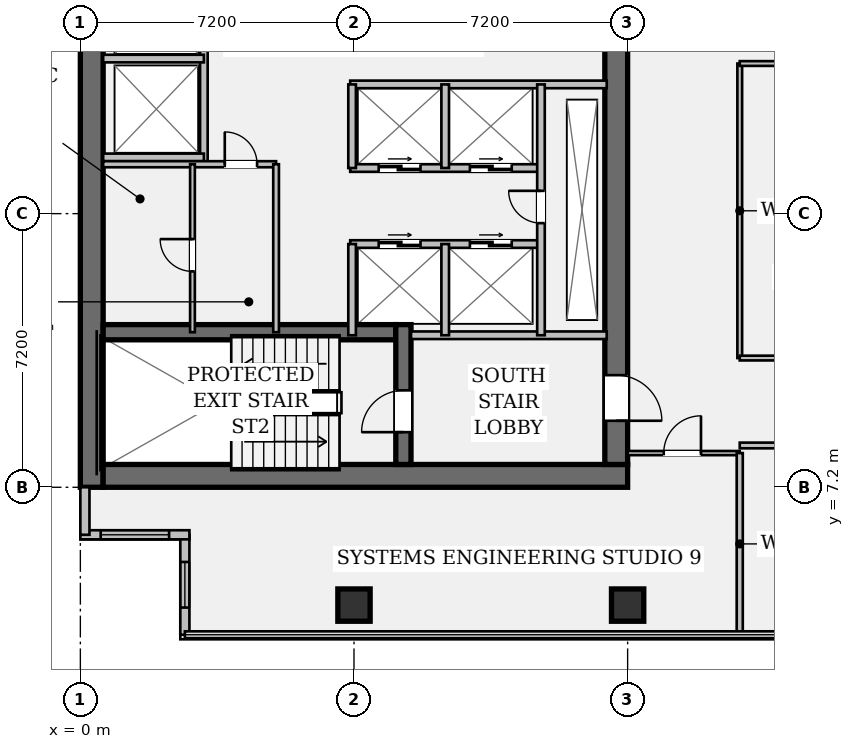
"""IFC4 building model, lengths in metres.
Left out: names, types, materials, properties, quantities, classifications, styles, units other than length and angle.
Written with IfcOpenShell. Run it as: python <this file> out.ifc"""

import sys

from ifc_helpers import new_model, si_unit, direction, frame, frame_2d, origin, origin_2d, place, context, subcontext, project, spatial, rectangle, hollow_rectangle, extrude, element, fill, save


model = new_model("IFC4")
c1 = context("Model", 3, precision=1e-05, world=origin(), true_north=direction((0.0, 1.0)))
c2 = subcontext(c1, "Body", "Model", "MODEL_VIEW")
j1 = project(units=[si_unit("LENGTHUNIT", "METRE"), si_unit("PLANEANGLEUNIT", "RADIAN")], contexts=[c1])
p1 = place(None, origin())
s1 = spatial("IfcSite", under=j1, at=p1, CompositionType="ELEMENT")
p2 = place(p1, origin())
s2 = spatial("IfcBuilding", under=s1, at=p2, CompositionType="ELEMENT")
p3 = place(p2, frame((0.0, 0.0, 159.95)))
s3 = spatial("IfcBuildingStorey", under=s2, at=p3, CompositionType="ELEMENT", Elevation=159.95)
p4 = place(p3, frame((0.3, 7.2, 0.0), z_axis=(0.0, 0.0, 1.0), x_axis=(0.0, 1.0, 0.0)))
e1 = element("IfcWall", 1, at=p4, inside=s3, PredefinedType="SHEAR", context=c2, shape_type="SweptSolid", body=[
    extrude(rectangle(XDim=28.8, YDim=0.6, at=frame_2d((14.4, 0.0))), origin(), (0.0, 0.0, 1.0), 3.58),
])
p5 = place(p3, frame((0.6, 7.5, 0.0), z_axis=(0.0, 0.0, 1.0), x_axis=(1.0, 0.0, 0.0)))
e2 = element("IfcWall", 2, at=p5, inside=s3, PredefinedType="SHEAR", context=c2, shape_type="SweptSolid", body=[
    extrude(rectangle(XDim=13.8, YDim=0.6, at=frame_2d((6.9, 0.0))), origin(), (0.0, 0.0, 1.0), 3.58),
])
p6 = place(p3, frame((14.1, 35.4, 0.0), z_axis=(0.0, 0.0, 1.0), x_axis=(0.0, -1.0, 0.0)))
e3 = element("IfcWall", 3, at=p6, inside=s3, PredefinedType="SHEAR", context=c2, shape_type="SweptSolid", body=[
    extrude(rectangle(XDim=27.6, YDim=0.6, at=frame_2d((13.8, 0.0))), origin(), (0.0, 0.0, 1.0), 3.58),
])
p7 = place(p6, frame((1.3, 0.0, 0.0)))
e4 = element("IfcOpeningElement", 4, at=p7, cuts=e3, PredefinedType="OPENING", context=c2, shape_type="SweptSolid", body=[
    extrude(rectangle(XDim=1.2, YDim=2.15, at=frame_2d((0.6, 1.075))), frame((0.0, 0.312, 0.0), z_axis=(0.0, -1.0, 0.0), x_axis=(1.0, 0.0, 0.0)), (0.0, 0.0, 1.0), 0.624),
])
p8 = place(p6, frame((25.25, 0.0, 0.0)))
e5 = element("IfcOpeningElement", 5, at=p8, cuts=e3, PredefinedType="OPENING", context=c2, shape_type="SweptSolid", body=[
    extrude(rectangle(XDim=1.2, YDim=2.15, at=frame_2d((0.6, 1.075))), frame((0.0, 0.312, 0.0), z_axis=(0.0, -1.0, 0.0), x_axis=(1.0, 0.0, 0.0)), (0.0, 0.0, 1.0), 0.624),
])
p9 = place(p6, frame((14.6, 0.0, 0.0)))
e6 = element("IfcOpeningElement", 6, at=p9, cuts=e3, PredefinedType="OPENING", context=c2, shape_type="SweptSolid", body=[
    extrude(rectangle(XDim=1.6, YDim=2.2, at=frame_2d((0.8, 1.1))), frame((0.0, 0.312, 0.0), z_axis=(0.0, -1.0, 0.0), x_axis=(1.0, 0.0, 0.0)), (0.0, 0.0, 1.0), 0.624),
])
p10 = place(p3, frame((0.6, 11.28, 0.0), z_axis=(0.0, 0.0, 1.0), x_axis=(1.0, 0.0, 0.0)))
e7 = element("IfcWall", 7, at=p10, inside=s3, PredefinedType="SHEAR", context=c2, shape_type="SweptSolid", body=[
    extrude(rectangle(XDim=7.7, YDim=0.4, at=frame_2d((3.85, 0.0))), origin(), (0.0, 0.0, 1.0), 3.58),
])
p11 = place(p3, frame((8.5, 7.8, 0.0), z_axis=(0.0, 0.0, 1.0), x_axis=(0.0, 1.0, 0.0)))
e8 = element("IfcWall", 8, at=p11, inside=s3, PredefinedType="SHEAR", context=c2, shape_type="SweptSolid", body=[
    extrude(rectangle(XDim=3.68, YDim=0.4, at=frame_2d((1.84, 0.0))), origin(), (0.0, 0.0, 1.0), 3.58),
])
p12 = place(p11, frame((0.85, 0.0, 0.0)))
e9 = element("IfcOpeningElement", 9, at=p12, cuts=e8, PredefinedType="OPENING", context=c2, shape_type="SweptSolid", body=[
    extrude(rectangle(XDim=1.1, YDim=2.15, at=frame_2d((0.55, 1.075))), frame((0.0, 0.212, 0.0), z_axis=(0.0, -1.0, 0.0), x_axis=(1.0, 0.0, 0.0)), (0.0, 0.0, 1.0), 0.424),
])
for number, where, z_axis, x_axis in (
    (10, (7.2, 4.1, 0.0), (0.0, 0.0, 1.0), (1.0, 0.0, 0.0)),
    (11, (14.4, 4.1, 0.0), (0.0, 0.0, 1.0), (1.0, 0.0, 0.0)),
):
    element("IfcColumn", number, at=place(p3, frame(where, z_axis=z_axis, x_axis=x_axis)), inside=s3, PredefinedType="COLUMN", context=c2, shape_type="SweptSolid", body=[
        extrude(hollow_rectangle(XDim=0.85, YDim=0.85, WallThickness=0.05, at=origin_2d()), origin(), (0.0, 0.0, 1.0), 3.58),
    ])
p13 = place(p3, frame((2.75, 3.32, 0.0), z_axis=(0.0, 0.0, 1.0), x_axis=(0.0, 1.0, 0.0)))
e12 = element("IfcWall", 12, at=p13, inside=s3, PredefinedType="STANDARD", context=c2, shape_type="SweptSolid", body=[
    extrude(rectangle(XDim=2.63, YDim=0.24, at=frame_2d((1.315, 0.0))), origin(), (0.0, 0.0, 1.0), 3.58),
])
p14 = place(p13, frame((0.715, 0.0, 0.95)))
e13 = element("IfcOpeningElement", 13, at=p14, cuts=e12, PredefinedType="OPENING", context=c2, shape_type="SweptSolid", body=[
    extrude(rectangle(XDim=1.2, YDim=1.8, at=frame_2d((0.6, 0.9))), frame((0.0, 0.132, 0.0), z_axis=(0.0, -1.0, 0.0), x_axis=(1.0, 0.0, 0.0)), (0.0, 0.0, 1.0), 0.264),
])
p15 = place(p3, frame((2.87, 5.95, 0.0), z_axis=(0.0, 0.0, 1.0), x_axis=(-1.0, 0.0, 0.0)))
e14 = element("IfcWall", 14, at=p15, inside=s3, PredefinedType="STANDARD", context=c2, shape_type="SweptSolid", body=[
    extrude(rectangle(XDim=2.87, YDim=0.24, at=frame_2d((1.435, 0.0))), origin(), (0.0, 0.0, 1.0), 3.58),
])
p16 = place(p15, frame((0.535, 0.0, 0.95)))
e15 = element("IfcOpeningElement", 15, at=p16, cuts=e14, PredefinedType="OPENING", context=c2, shape_type="SweptSolid", body=[
    extrude(rectangle(XDim=1.8, YDim=1.35, at=frame_2d((0.9, 0.675))), frame((0.0, 0.132, 0.0), z_axis=(0.0, -1.0, 0.0), x_axis=(1.0, 0.0, 0.0)), (0.0, 0.0, 1.0), 0.264),
])
p17 = place(p3, frame((0.12, 5.95, 0.0), z_axis=(0.0, 0.0, 1.0), x_axis=(0.0, 1.0, 0.0)))
e16 = element("IfcWall", 16, at=p17, inside=s3, PredefinedType="STANDARD", context=c2, shape_type="SweptSolid", body=[
    extrude(rectangle(XDim=1.25, YDim=0.24, at=frame_2d((0.625, 0.0))), origin(), (0.0, 0.0, 1.0), 3.58),
])
p18 = place(p3, frame((8.7, 11.2, 0.0), z_axis=(0.0, 0.0, 1.0), x_axis=(1.0, 0.0, 0.0)))
e17 = element("IfcWall", 17, at=p18, inside=s3, PredefinedType="PARTITIONING", context=c2, shape_type="SweptSolid", body=[
    extrude(rectangle(XDim=5.15, YDim=0.2, at=frame_2d((2.575, 0.0))), origin(), (0.0, 0.0, 1.0), 3.58),
])
p19 = place(p3, frame((3.25, 15.7, 0.0), z_axis=(0.0, 0.0, 1.0), x_axis=(0.0, 1.0, 0.0)))
e18 = element("IfcWall", 18, at=p19, inside=s3, PredefinedType="PARTITIONING", context=c2, shape_type="SweptSolid", body=[
    extrude(rectangle(XDim=13.08, YDim=0.2, at=frame_2d((6.54, 0.0))), origin(), (0.0, 0.0, 1.0), 3.58),
])
for number, where, z_axis, x_axis in (
    (19, (0.6, 15.88, 0.0), (0.0, 0.0, 1.0), (1.0, 0.0, 0.0)),
    (20, (0.6, 18.48, 0.0), (0.0, 0.0, 1.0), (1.0, 0.0, 0.0)),
):
    element("IfcWall", number, at=place(p3, frame(where, z_axis=z_axis, x_axis=x_axis)), inside=s3, PredefinedType="PARTITIONING", context=c2, shape_type="SweptSolid", body=[
        extrude(rectangle(XDim=2.65, YDim=0.2, at=frame_2d((1.325, 0.0))), origin(), (0.0, 0.0, 1.0), 3.58),
    ])
p20 = place(p3, frame((7.1, 17.8, 0.0), z_axis=(0.0, 0.0, 1.0), x_axis=(1.0, 0.0, 0.0)))
e21 = element("IfcWall", 21, at=p20, inside=s3, PredefinedType="PARTITIONING", context=c2, shape_type="SweptSolid", body=[
    extrude(rectangle(XDim=6.75, YDim=0.2, at=frame_2d((3.375, 0.0))), origin(), (0.0, 0.0, 1.0), 3.58),
])
p21 = place(p3, frame((7.1, 15.6, 0.0), z_axis=(0.0, 0.0, 1.0), x_axis=(1.0, 0.0, 0.0)))
e22 = element("IfcWall", 22, at=p21, inside=s3, PredefinedType="PARTITIONING", context=c2, shape_type="SweptSolid", body=[
    extrude(rectangle(XDim=5.02, YDim=0.2, at=frame_2d((2.51, 0.0))), origin(), (0.0, 0.0, 1.0), 3.58),
])
p22 = place(p21, frame((0.75, 0.0, 0.0)))
e23 = element("IfcOpeningElement", 23, at=p22, cuts=e22, PredefinedType="OPENING", context=c2, shape_type="SweptSolid", body=[
    extrude(rectangle(XDim=1.1, YDim=2.2, at=frame_2d((0.55, 1.1))), frame((0.0, 0.112, 0.0), z_axis=(0.0, -1.0, 0.0), x_axis=(1.0, 0.0, 0.0)), (0.0, 0.0, 1.0), 0.224),
])
p23 = place(p21, frame((3.15, 0.0, 0.0)))
e24 = element("IfcOpeningElement", 24, at=p23, cuts=e22, PredefinedType="OPENING", context=c2, shape_type="SweptSolid", body=[
    extrude(rectangle(XDim=1.1, YDim=2.2, at=frame_2d((0.55, 1.1))), frame((0.0, 0.112, 0.0), z_axis=(0.0, -1.0, 0.0), x_axis=(1.0, 0.0, 0.0)), (0.0, 0.0, 1.0), 0.224),
])
p24 = place(p3, frame((7.1, 13.6, 0.0), z_axis=(0.0, 0.0, 1.0), x_axis=(1.0, 0.0, 0.0)))
e25 = element("IfcWall", 25, at=p24, inside=s3, PredefinedType="PARTITIONING", context=c2, shape_type="SweptSolid", body=[
    extrude(rectangle(XDim=5.02, YDim=0.2, at=frame_2d((2.51, 0.0))), origin(), (0.0, 0.0, 1.0), 3.58),
])
p25 = place(p24, frame((0.75, 0.0, 0.0)))
e26 = element("IfcOpeningElement", 26, at=p25, cuts=e25, PredefinedType="OPENING", context=c2, shape_type="SweptSolid", body=[
    extrude(rectangle(XDim=1.1, YDim=2.2, at=frame_2d((0.55, 1.1))), frame((0.0, 0.112, 0.0), z_axis=(0.0, -1.0, 0.0), x_axis=(1.0, 0.0, 0.0)), (0.0, 0.0, 1.0), 0.224),
])
p26 = place(p24, frame((3.15, 0.0, 0.0)))
e27 = element("IfcOpeningElement", 27, at=p26, cuts=e25, PredefinedType="OPENING", context=c2, shape_type="SweptSolid", body=[
    extrude(rectangle(XDim=1.1, YDim=2.2, at=frame_2d((0.55, 1.1))), frame((0.0, 0.112, 0.0), z_axis=(0.0, -1.0, 0.0), x_axis=(1.0, 0.0, 0.0)), (0.0, 0.0, 1.0), 0.224),
])
p27 = place(p3, frame((7.15, 15.6, 0.0), z_axis=(0.0, 0.0, 1.0), x_axis=(0.0, 1.0, 0.0)))
e28 = element("IfcWall", 28, at=p27, inside=s3, PredefinedType="PARTITIONING", context=c2, shape_type="SweptSolid", body=[
    extrude(rectangle(XDim=2.2, YDim=0.2, at=frame_2d((1.1, 0.0))), origin(), (0.0, 0.0, 1.0), 3.58),
])
p28 = place(p3, frame((7.15, 11.2, 0.0), z_axis=(0.0, 0.0, 1.0), x_axis=(0.0, 1.0, 0.0)))
e29 = element("IfcWall", 29, at=p28, inside=s3, PredefinedType="PARTITIONING", context=c2, shape_type="SweptSolid", body=[
    extrude(rectangle(XDim=2.4, YDim=0.2, at=frame_2d((1.2, 0.0))), origin(), (0.0, 0.0, 1.0), 3.58),
])
p29 = place(p3, frame((9.6, 15.6, 0.0), z_axis=(0.0, 0.0, 1.0), x_axis=(0.0, 1.0, 0.0)))
e30 = element("IfcWall", 30, at=p29, inside=s3, PredefinedType="PARTITIONING", context=c2, shape_type="SweptSolid", body=[
    extrude(rectangle(XDim=2.2, YDim=0.2, at=frame_2d((1.1, 0.0))), origin(), (0.0, 0.0, 1.0), 3.58),
])
p30 = place(p3, frame((9.6, 11.2, 0.0), z_axis=(0.0, 0.0, 1.0), x_axis=(0.0, 1.0, 0.0)))
e31 = element("IfcWall", 31, at=p30, inside=s3, PredefinedType="PARTITIONING", context=c2, shape_type="SweptSolid", body=[
    extrude(rectangle(XDim=2.4, YDim=0.2, at=frame_2d((1.2, 0.0))), origin(), (0.0, 0.0, 1.0), 3.58),
])
p31 = place(p3, frame((12.12, 11.2, 0.0), z_axis=(0.0, 0.0, 1.0), x_axis=(0.0, 1.0, 0.0)))
e32 = element("IfcWall", 32, at=p31, inside=s3, PredefinedType="PARTITIONING", context=c2, shape_type="SweptSolid", body=[
    extrude(rectangle(XDim=6.6, YDim=0.2, at=frame_2d((3.3, 0.0))), origin(), (0.0, 0.0, 1.0), 3.58),
])
p32 = place(p31, frame((2.95, 0.0, 0.0)))
e33 = element("IfcOpeningElement", 33, at=p32, cuts=e32, PredefinedType="OPENING", context=c2, shape_type="SweptSolid", body=[
    extrude(rectangle(XDim=0.85, YDim=2.15, at=frame_2d((0.425, 1.075))), frame((0.0, 0.112, 0.0), z_axis=(0.0, -1.0, 0.0), x_axis=(1.0, 0.0, 0.0)), (0.0, 0.0, 1.0), 0.224),
])
p33 = place(p3, frame((0.6, 15.7, 0.0), z_axis=(0.0, 0.0, 1.0), x_axis=(1.0, 0.0, 0.0)))
e34 = element("IfcWall", 34, at=p33, inside=s3, PredefinedType="PARTITIONING", context=c2, shape_type="SweptSolid", body=[
    extrude(rectangle(XDim=4.55, YDim=0.16, at=frame_2d((2.275, 0.0))), origin(), (0.0, 0.0, 1.0), 3.58),
])
p34 = place(p33, frame((3.2, 0.0, 0.0)))
e35 = element("IfcOpeningElement", 35, at=p34, cuts=e34, PredefinedType="OPENING", context=c2, shape_type="SweptSolid", body=[
    extrude(rectangle(XDim=0.85, YDim=2.15, at=frame_2d((0.425, 1.075))), frame((0.0, 0.092, 0.0), z_axis=(0.0, -1.0, 0.0), x_axis=(1.0, 0.0, 0.0)), (0.0, 0.0, 1.0), 0.184),
])
p35 = place(p3, frame((5.15, 11.28, 0.0), z_axis=(0.0, 0.0, 1.0), x_axis=(0.0, 1.0, 0.0)))
e36 = element("IfcWall", 36, at=p35, inside=s3, PredefinedType="PARTITIONING", context=c2, shape_type="SweptSolid", body=[
    extrude(rectangle(XDim=4.42, YDim=0.15, at=frame_2d((2.21, 0.0))), origin(), (0.0, 0.0, 1.0), 3.58),
])
p36 = place(p3, frame((2.95, 11.28, 0.0), z_axis=(0.0, 0.0, 1.0), x_axis=(0.0, 1.0, 0.0)))
e37 = element("IfcWall", 37, at=p36, inside=s3, PredefinedType="PARTITIONING", context=c2, shape_type="SweptSolid", body=[
    extrude(rectangle(XDim=4.42, YDim=0.125, at=frame_2d((2.21, 0.0))), origin(), (0.0, 0.0, 1.0), 3.58),
])
p37 = place(p36, frame((1.6, 0.0, 0.0)))
e38 = element("IfcOpeningElement", 38, at=p37, cuts=e37, PredefinedType="OPENING", context=c2, shape_type="SweptSolid", body=[
    extrude(rectangle(XDim=0.85, YDim=2.15, at=frame_2d((0.425, 1.075))), frame((0.0, 0.074, 0.0), z_axis=(0.0, -1.0, 0.0), x_axis=(1.0, 0.0, 0.0)), (0.0, 0.0, 1.0), 0.149),
])
p38 = place(p3, frame((14.4, 8.1, 0.0), z_axis=(0.0, 0.0, 1.0), x_axis=(1.0, 0.0, 0.0)))
e39 = element("IfcWall", 39, at=p38, inside=s3, PredefinedType="PARTITIONING", context=c2, shape_type="SweptSolid", body=[
    extrude(rectangle(XDim=2.95, YDim=0.11, at=frame_2d((1.475, 0.0))), origin(), (0.0, 0.0, 1.0), 3.148),
])
p39 = place(p38, frame((0.95, 0.0, 0.0)))
e40 = element("IfcOpeningElement", 40, at=p39, cuts=e39, PredefinedType="OPENING", context=c2, shape_type="SweptSolid", body=[
    extrude(rectangle(XDim=0.98, YDim=2.15, at=frame_2d((0.49, 1.075))), frame((0.0, 0.067, 0.0), z_axis=(0.0, -1.0, 0.0), x_axis=(1.0, 0.0, 0.0)), (0.0, 0.0, 1.0), 0.134),
])
p40 = place(p3, frame((17.35, 8.3, 0.0), z_axis=(0.0, 0.0, 1.0), x_axis=(1.0, 0.0, 0.0)))
e41 = element("IfcWall", 41, at=p40, inside=s3, PredefinedType="PARTITIONING", context=c2, shape_type="SweptSolid", body=[
    extrude(rectangle(XDim=21.15, YDim=0.15, at=frame_2d((10.575, 0.0))), origin(), (0.0, 0.0, 1.0), 2.869),
])
p41 = place(p40, frame((2.32, 0.0, 0.0)))
e42 = element("IfcOpeningElement", 42, at=p41, cuts=e41, PredefinedType="OPENING", context=c2, shape_type="SweptSolid", body=[
    extrude(rectangle(XDim=0.98, YDim=2.15, at=frame_2d((0.49, 1.075))), frame((0.0, 0.087, 0.0), z_axis=(0.0, -1.0, 0.0), x_axis=(1.0, 0.0, 0.0)), (0.0, 0.0, 1.0), 0.174),
])
p42 = place(p40, frame((9.85, 0.0, 0.0)))
e43 = element("IfcOpeningElement", 43, at=p42, cuts=e41, PredefinedType="OPENING", context=c2, shape_type="SweptSolid", body=[
    extrude(rectangle(XDim=0.98, YDim=2.15, at=frame_2d((0.49, 1.075))), frame((0.0, 0.087, 0.0), z_axis=(0.0, -1.0, 0.0), x_axis=(1.0, 0.0, 0.0)), (0.0, 0.0, 1.0), 0.174),
])
p43 = place(p40, frame((16.8, 0.0, 0.0)))
e44 = element("IfcOpeningElement", 44, at=p43, cuts=e41, PredefinedType="OPENING", context=c2, shape_type="SweptSolid", body=[
    extrude(rectangle(XDim=0.98, YDim=2.15, at=frame_2d((0.49, 1.075))), frame((0.0, 0.087, 0.0), z_axis=(0.0, -1.0, 0.0), x_axis=(1.0, 0.0, 0.0)), (0.0, 0.0, 1.0), 0.174),
])
p44 = place(p3, frame((17.35, 10.6, 0.0), z_axis=(0.0, 0.0, 1.0), x_axis=(0.0, 1.0, 0.0)))
e45 = element("IfcWall", 45, at=p44, inside=s3, PredefinedType="PARTITIONING", context=c2, shape_type="SweptSolid", body=[
    extrude(rectangle(XDim=7.75, YDim=0.125, at=frame_2d((3.875, 0.0))), origin(), (0.0, 0.0, 1.0), 2.869),
])
p45 = place(p3, frame((17.35, 10.6, 0.0), z_axis=(0.0, 0.0, 1.0), x_axis=(1.0, 0.0, 0.0)))
e46 = element("IfcWall", 46, at=p45, inside=s3, PredefinedType="PARTITIONING", context=c2, shape_type="SweptSolid", body=[
    extrude(rectangle(XDim=18.8, YDim=0.125, at=frame_2d((9.4, 0.0))), origin(), (0.0, 0.0, 1.0), 2.869),
])
p46 = place(p3, frame((17.35, 18.35, 0.0), z_axis=(0.0, 0.0, 1.0), x_axis=(1.0, 0.0, 0.0)))
e47 = element("IfcWall", 47, at=p46, inside=s3, PredefinedType="PARTITIONING", context=c2, shape_type="SweptSolid", body=[
    extrude(rectangle(XDim=18.8, YDim=0.125, at=frame_2d((9.4, 0.0))), origin(), (0.0, 0.0, 1.0), 2.869),
])
p47 = place(p46, frame((2.82, 0.0, 0.0)))
e48 = element("IfcOpeningElement", 48, at=p47, cuts=e47, PredefinedType="OPENING", context=c2, shape_type="SweptSolid", body=[
    extrude(rectangle(XDim=0.98, YDim=2.15, at=frame_2d((0.49, 1.075))), frame((0.0, 0.074, 0.0), z_axis=(0.0, -1.0, 0.0), x_axis=(1.0, 0.0, 0.0)), (0.0, 0.0, 1.0), 0.149),
])
p48 = place(p46, frame((9.75, 0.0, 0.0)))
e49 = element("IfcOpeningElement", 49, at=p48, cuts=e47, PredefinedType="OPENING", context=c2, shape_type="SweptSolid", body=[
    extrude(rectangle(XDim=0.98, YDim=2.15, at=frame_2d((0.49, 1.075))), frame((0.0, 0.074, 0.0), z_axis=(0.0, -1.0, 0.0), x_axis=(1.0, 0.0, 0.0)), (0.0, 0.0, 1.0), 0.149),
])
p49 = place(p46, frame((15.82, 0.0, 0.0)))
e50 = element("IfcOpeningElement", 50, at=p49, cuts=e47, PredefinedType="OPENING", context=c2, shape_type="SweptSolid", body=[
    extrude(rectangle(XDim=0.98, YDim=2.15, at=frame_2d((0.49, 1.075))), frame((0.0, 0.074, 0.0), z_axis=(0.0, -1.0, 0.0), x_axis=(1.0, 0.0, 0.0)), (0.0, 0.0, 1.0), 0.149),
])
p50 = place(p3, frame((17.35, 3.32, 0.0), z_axis=(0.0, 0.0, 1.0), x_axis=(0.0, 1.0, 0.0)))
e51 = element("IfcWall", 51, at=p50, inside=s3, PredefinedType="PARTITIONING", context=c2, shape_type="SweptSolid", body=[
    extrude(rectangle(XDim=4.78, YDim=0.16, at=frame_2d((2.39, 0.0))), origin(), (0.0, 0.0, 1.0), 2.869),
])
p51 = place(p14, origin())
e52 = element("IfcWindow", 52, at=p51, inside=s3, PartitioningType="SINGLE_PANEL", PredefinedType="WINDOW", context=c2, shape_type="SweptSolid", body=[
    extrude(rectangle(XDim=1.2, YDim=1.8, at=frame_2d((0.6, 0.9))), frame((0.0, 0.03, 0.0), z_axis=(0.0, -1.0, 0.0), x_axis=(1.0, 0.0, 0.0)), (0.0, 0.0, 1.0), 0.06),
])
fill(e13, e52)
p52 = place(p16, origin())
e53 = element("IfcWindow", 53, at=p52, inside=s3, PartitioningType="SINGLE_PANEL", PredefinedType="WINDOW", context=c2, shape_type="SweptSolid", body=[
    extrude(rectangle(XDim=1.8, YDim=1.35, at=frame_2d((0.9, 0.675))), frame((0.0, 0.03, 0.0), z_axis=(0.0, -1.0, 0.0), x_axis=(1.0, 0.0, 0.0)), (0.0, 0.0, 1.0), 0.06),
])
fill(e15, e53)
p53 = place(p12, origin())
e54 = element("IfcDoor", 54, at=p53, inside=s3, OperationType="SINGLE_SWING_LEFT", PredefinedType="DOOR", context=c2, shape_type="SweptSolid", body=[
    extrude(rectangle(XDim=1.1, YDim=2.15, at=frame_2d((0.55, 1.075))), frame((0.0, 0.025, 0.0), z_axis=(0.0, -1.0, 0.0), x_axis=(1.0, 0.0, 0.0)), (0.0, 0.0, 1.0), 0.05),
])
fill(e9, e54)
p54 = place(p8, origin())
e55 = element("IfcDoor", 55, at=p54, inside=s3, OperationType="SINGLE_SWING_RIGHT", PredefinedType="DOOR", context=c2, shape_type="SweptSolid", body=[
    extrude(rectangle(XDim=1.2, YDim=2.15, at=frame_2d((0.6, 1.075))), frame((0.0, 0.025, 0.0), z_axis=(0.0, -1.0, 0.0), x_axis=(1.0, 0.0, 0.0)), (0.0, 0.0, 1.0), 0.05),
])
fill(e5, e55)
p55 = place(p32, origin())
e56 = element("IfcDoor", 56, at=p55, inside=s3, OperationType="SINGLE_SWING_RIGHT", PredefinedType="DOOR", context=c2, shape_type="SweptSolid", body=[
    extrude(rectangle(XDim=0.85, YDim=2.15, at=frame_2d((0.425, 1.075))), frame((0.0, 0.025, 0.0), z_axis=(0.0, -1.0, 0.0), x_axis=(1.0, 0.0, 0.0)), (0.0, 0.0, 1.0), 0.05),
])
fill(e33, e56)
p56 = place(p22, origin())
e57 = element("IfcDoor", 57, at=p56, inside=s3, OperationType="DOUBLE_DOOR_SLIDING", PredefinedType="DOOR", context=c2, shape_type="SweptSolid", body=[
    extrude(rectangle(XDim=1.1, YDim=2.2, at=frame_2d((0.55, 1.1))), frame((0.0, 0.025, 0.0), z_axis=(0.0, -1.0, 0.0), x_axis=(1.0, 0.0, 0.0)), (0.0, 0.0, 1.0), 0.05),
])
fill(e23, e57)
p57 = place(p23, origin())
e58 = element("IfcDoor", 58, at=p57, inside=s3, OperationType="DOUBLE_DOOR_SLIDING", PredefinedType="DOOR", context=c2, shape_type="SweptSolid", body=[
    extrude(rectangle(XDim=1.1, YDim=2.2, at=frame_2d((0.55, 1.1))), frame((0.0, 0.025, 0.0), z_axis=(0.0, -1.0, 0.0), x_axis=(1.0, 0.0, 0.0)), (0.0, 0.0, 1.0), 0.05),
])
fill(e24, e58)
p58 = place(p25, origin())
e59 = element("IfcDoor", 59, at=p58, inside=s3, OperationType="DOUBLE_DOOR_SLIDING", PredefinedType="DOOR", context=c2, shape_type="SweptSolid", body=[
    extrude(rectangle(XDim=1.1, YDim=2.2, at=frame_2d((0.55, 1.1))), frame((0.0, 0.025, 0.0), z_axis=(0.0, -1.0, 0.0), x_axis=(1.0, 0.0, 0.0)), (0.0, 0.0, 1.0), 0.05),
])
fill(e26, e59)
p59 = place(p26, origin())
e60 = element("IfcDoor", 60, at=p59, inside=s3, OperationType="DOUBLE_DOOR_SLIDING", PredefinedType="DOOR", context=c2, shape_type="SweptSolid", body=[
    extrude(rectangle(XDim=1.1, YDim=2.2, at=frame_2d((0.55, 1.1))), frame((0.0, 0.025, 0.0), z_axis=(0.0, -1.0, 0.0), x_axis=(1.0, 0.0, 0.0)), (0.0, 0.0, 1.0), 0.05),
])
fill(e27, e60)
p60 = place(p34, origin())
e61 = element("IfcDoor", 61, at=p60, inside=s3, OperationType="SINGLE_SWING_LEFT", PredefinedType="DOOR", context=c2, shape_type="SweptSolid", body=[
    extrude(rectangle(XDim=0.85, YDim=2.15, at=frame_2d((0.425, 1.075))), frame((0.0, 0.025, 0.0), z_axis=(0.0, -1.0, 0.0), x_axis=(1.0, 0.0, 0.0)), (0.0, 0.0, 1.0), 0.05),
])
fill(e35, e61)
p61 = place(p37, origin())
e62 = element("IfcDoor", 62, at=p61, inside=s3, OperationType="SINGLE_SWING_RIGHT", PredefinedType="DOOR", context=c2, shape_type="SweptSolid", body=[
    extrude(rectangle(XDim=0.85, YDim=2.15, at=frame_2d((0.425, 1.075))), frame((0.0, 0.025, 0.0), z_axis=(0.0, -1.0, 0.0), x_axis=(1.0, 0.0, 0.0)), (0.0, 0.0, 1.0), 0.05),
])
fill(e38, e62)
p62 = place(p39, origin())
e63 = element("IfcDoor", 63, at=p62, inside=s3, OperationType="SINGLE_SWING_RIGHT", PredefinedType="DOOR", context=c2, shape_type="SweptSolid", body=[
    extrude(rectangle(XDim=0.98, YDim=2.15, at=frame_2d((0.49, 1.075))), frame((0.0, 0.025, 0.0), z_axis=(0.0, -1.0, 0.0), x_axis=(1.0, 0.0, 0.0)), (0.0, 0.0, 1.0), 0.05),
])
fill(e40, e63)
save(model, sys.argv[1])
